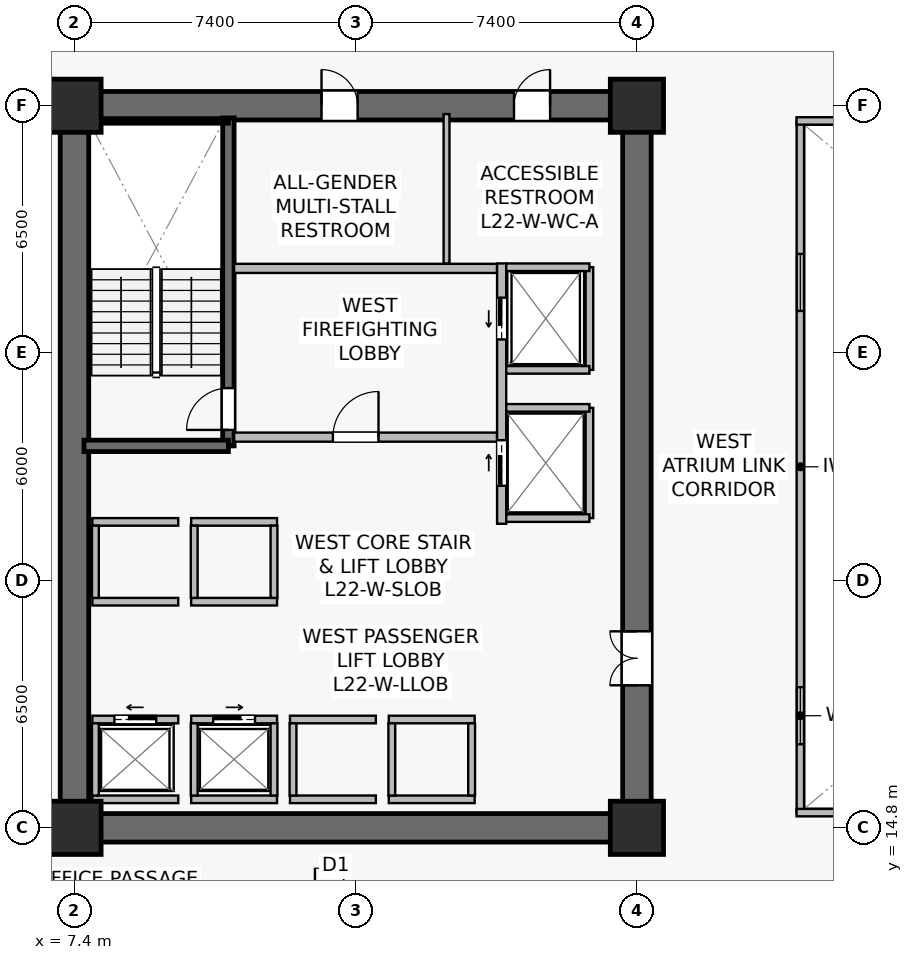
"""IFC4 building model, lengths in metres.
Left out: names, types, materials, properties, quantities, classifications, styles, units other than length and angle.
Written with IfcOpenShell. Run it as: python <this file> out.ifc"""

import sys

from ifc_helpers import new_model, si_unit, direction, frame, frame_2d, origin, origin_2d, place, context, subcontext, project, spatial, rectangle, extrude, source, transform, mapped, element, fill, save


model = new_model("IFC4")
c1 = context("Model", 3, precision=1e-05, world=origin(), true_north=direction((0.0, 1.0)))
c2 = subcontext(c1, "Body", "Model", "MODEL_VIEW")
j1 = project(units=[si_unit("LENGTHUNIT", "METRE"), si_unit("PLANEANGLEUNIT", "RADIAN")], contexts=[c1])
p1 = place(None, origin())
s1 = spatial("IfcSite", under=j1, at=p1, CompositionType="ELEMENT")
p2 = place(p1, origin())
s2 = spatial("IfcBuilding", under=s1, at=p2, CompositionType="ELEMENT")
p3 = place(p2, frame((0.0, 0.0, 90.8)))
s3 = spatial("IfcBuildingStorey", under=s2, at=p3, CompositionType="ELEMENT", Elevation=90.8)
p4 = place(p3, frame((7.025, 14.8, 0.0), z_axis=(0.0, 0.0, 1.0), x_axis=(1.0, 0.0, 0.0)))
e1 = element("IfcWall", 1, at=p4, inside=s3, PredefinedType="SHEAR", context=c2, shape_type="SweptSolid", body=[
    extrude(rectangle(XDim=15.55, YDim=0.75, at=frame_2d((7.775, 0.0))), origin(), (0.0, 0.0, 1.0), 3.78),
])
p5 = place(p3, frame((7.025, 33.8, 0.0), z_axis=(0.0, 0.0, 1.0), x_axis=(1.0, 0.0, 0.0)))
e2 = element("IfcWall", 2, at=p5, inside=s3, PredefinedType="SHEAR", context=c2, shape_type="SweptSolid", body=[
    extrude(rectangle(XDim=15.55, YDim=0.75, at=frame_2d((7.775, 0.0))), origin(), (0.0, 0.0, 1.0), 3.78),
])
p6 = place(p5, frame((6.875, 0.0, 0.0)))
e3 = element("IfcOpeningElement", 3, at=p6, cuts=e2, PredefinedType="OPENING", context=c2, shape_type="SweptSolid", body=[
    extrude(rectangle(XDim=0.95, YDim=2.15, at=frame_2d((0.475, 1.075))), frame((0.0, 0.385, 0.0), z_axis=(0.0, -1.0, 0.0), x_axis=(1.0, 0.0, 0.0)), (0.0, 0.0, 1.0), 0.77),
])
p7 = place(p5, frame((11.94, 0.0, 0.0)))
e4 = element("IfcOpeningElement", 4, at=p7, cuts=e2, PredefinedType="OPENING", context=c2, shape_type="SweptSolid", body=[
    extrude(rectangle(XDim=0.95, YDim=2.15, at=frame_2d((0.475, 1.075))), frame((0.0, 0.385, 0.0), z_axis=(0.0, -1.0, 0.0), x_axis=(1.0, 0.0, 0.0)), (0.0, 0.0, 1.0), 0.77),
])
p8 = place(p3, frame((7.4, 15.175, 0.0), z_axis=(0.0, 0.0, 1.0), x_axis=(0.0, 1.0, 0.0)))
e5 = element("IfcWall", 5, at=p8, inside=s3, PredefinedType="SHEAR", context=c2, shape_type="SweptSolid", body=[
    extrude(rectangle(XDim=18.25, YDim=0.75, at=frame_2d((9.125, 0.0))), origin(), (0.0, 0.0, 1.0), 3.78),
])
p9 = place(p3, frame((22.2, 15.175, 0.0), z_axis=(0.0, 0.0, 1.0), x_axis=(0.0, 1.0, 0.0)))
e6 = element("IfcWall", 6, at=p9, inside=s3, PredefinedType="SHEAR", context=c2, shape_type="SweptSolid", body=[
    extrude(rectangle(XDim=18.25, YDim=0.75, at=frame_2d((9.125, 0.0))), origin(), (0.0, 0.0, 1.0), 3.78),
])
p10 = place(p9, frame((3.375, 0.0, 0.0)))
e7 = element("IfcOpeningElement", 7, at=p10, cuts=e6, PredefinedType="OPENING", context=c2, shape_type="SweptSolid", body=[
    extrude(rectangle(XDim=1.42, YDim=2.2, at=frame_2d((0.71, 1.1))), frame((0.0, 0.385, 0.0), z_axis=(0.0, -1.0, 0.0), x_axis=(1.0, 0.0, 0.0)), (0.0, 0.0, 1.0), 0.77),
])
p11 = place(p3, frame((11.45, 24.85, 0.0), z_axis=(0.0, 0.0, 1.0), x_axis=(0.0, 1.0, 0.0)))
e8 = element("IfcWall", 8, at=p11, inside=s3, PredefinedType="SHEAR", context=c2, shape_type="SweptSolid", body=[
    extrude(rectangle(XDim=8.63, YDim=0.3, at=frame_2d((4.315, 0.0))), origin(), (0.0, 0.0, 1.0), 3.78),
])
p12 = place(p11, frame((0.42, 0.0, 0.0)))
e9 = element("IfcOpeningElement", 9, at=p12, cuts=e8, PredefinedType="OPENING", context=c2, shape_type="SweptSolid", body=[
    extrude(rectangle(XDim=1.1, YDim=2.15, at=frame_2d((0.55, 1.075))), frame((0.0, 0.16, 0.0), z_axis=(0.0, -1.0, 0.0), x_axis=(1.0, 0.0, 0.0)), (0.0, 0.0, 1.0), 0.32),
])
p13 = place(p3, frame((7.65, 24.85, 0.0), z_axis=(0.0, 0.0, 1.0), x_axis=(1.0, 0.0, 0.0)))
e10 = element("IfcWall", 10, at=p13, inside=s3, PredefinedType="SHEAR", context=c2, shape_type="SweptSolid", body=[
    extrude(rectangle(XDim=3.8, YDim=0.3, at=frame_2d((1.9, 0.0))), origin(), (0.0, 0.0, 1.0), 3.78),
])
p14 = place(p3, frame((7.73, 33.4, 0.0), z_axis=(0.0, 0.0, 1.0), x_axis=(1.0, 0.0, 0.0)))
e11 = element("IfcWall", 11, at=p14, inside=s3, PredefinedType="SOLIDWALL", context=c2, shape_type="SweptSolid", body=[
    extrude(rectangle(XDim=3.72, YDim=0.12, at=frame_2d((1.86, 0.0))), origin(), (0.0, 0.0, 1.0), 3.78),
])
m1 = source(origin(), c2, "Body", "SweptSolid", [
    extrude(rectangle(XDim=1.4, YDim=1.4, at=origin_2d()), origin(), (0.0, 0.0, 1.0), 4.1),
])
for number, where, z_axis, x_axis in (
    (12, (7.4, 14.8, 0.0), (0.0, 0.0, 1.0), (1.0, 0.0, 0.0)),
    (13, (22.2, 14.8, 0.0), (0.0, 0.0, 1.0), (1.0, 0.0, 0.0)),
    (14, (7.4, 33.8, 0.0), (0.0, 0.0, 1.0), (1.0, 0.0, 0.0)),
    (15, (22.2, 33.8, 0.0), (0.0, 0.0, 1.0), (1.0, 0.0, 0.0)),
):
    element("IfcColumn", number, at=place(p3, frame(where, z_axis=z_axis, x_axis=x_axis)), inside=s3, PredefinedType="COLUMN", context=c2, shape_type="MappedRepresentation", body=[
        mapped(m1, transform((0.0, 0.0, 0.0), scale=1.0)),
    ])
p15 = place(p3, frame((11.6, 25.08, 0.0), z_axis=(0.0, 0.0, 1.0), x_axis=(1.0, 0.0, 0.0)))
e16 = element("IfcWall", 16, at=p15, inside=s3, PredefinedType="SOLIDWALL", context=c2, shape_type="SweptSolid", body=[
    extrude(rectangle(XDim=6.92, YDim=0.24, at=frame_2d((3.46, 0.0))), origin(), (0.0, 0.0, 1.0), 3.115),
])
p16 = place(p15, frame((2.6, 0.0, 0.0)))
e17 = element("IfcOpeningElement", 17, at=p16, cuts=e16, PredefinedType="OPENING", context=c2, shape_type="SweptSolid", body=[
    extrude(rectangle(XDim=1.2, YDim=2.16, at=frame_2d((0.6, 1.08))), frame((0.0, 0.13, 0.0), z_axis=(0.0, -1.0, 0.0), x_axis=(1.0, 0.0, 0.0)), (0.0, 0.0, 1.0), 0.26),
])
p17 = place(p3, frame((11.6, 29.52, 0.0), z_axis=(0.0, 0.0, 1.0), x_axis=(1.0, 0.0, 0.0)))
e18 = element("IfcWall", 18, at=p17, inside=s3, PredefinedType="SOLIDWALL", context=c2, shape_type="SweptSolid", body=[
    extrude(rectangle(XDim=6.92, YDim=0.24, at=frame_2d((3.46, 0.0))), origin(), (0.0, 0.0, 1.0), 3.115),
])
p18 = place(p3, frame((18.64, 22.8, 0.0), z_axis=(0.0, 0.0, 1.0), x_axis=(0.0, 1.0, 0.0)))
e19 = element("IfcWall", 19, at=p18, inside=s3, PredefinedType="SOLIDWALL", context=c2, shape_type="SweptSolid", body=[
    extrude(rectangle(XDim=6.85, YDim=0.24, at=frame_2d((3.425, 0.0))), origin(), (0.0, 0.0, 1.0), 2.865),
])
p19 = place(p18, frame((4.85, 0.0, 0.0)))
e20 = element("IfcOpeningElement", 20, at=p19, cuts=e19, PredefinedType="OPENING", context=c2, shape_type="SweptSolid", body=[
    extrude(rectangle(XDim=1.1, YDim=2.22, at=frame_2d((0.55, 1.11))), frame((0.0, 0.13, 0.0), z_axis=(0.0, -1.0, 0.0), x_axis=(1.0, 0.0, 0.0)), (0.0, 0.0, 1.0), 0.26),
])
p20 = place(p18, frame((1.0, 0.0, 0.0)))
e21 = element("IfcOpeningElement", 21, at=p20, cuts=e19, PredefinedType="OPENING", context=c2, shape_type="SweptSolid", body=[
    extrude(rectangle(XDim=1.2, YDim=2.22, at=frame_2d((0.6, 1.11))), frame((0.0, 0.13, 0.0), z_axis=(0.0, -1.0, 0.0), x_axis=(1.0, 0.0, 0.0)), (0.0, 0.0, 1.0), 0.26),
])
p21 = place(p3, frame((7.87, 17.65, 0.0), z_axis=(0.0, 0.0, 1.0), x_axis=(1.0, 0.0, 0.0)))
e22 = element("IfcWall", 22, at=p21, inside=s3, PredefinedType="SOLIDWALL", context=c2, shape_type="SweptSolid", body=[
    extrude(rectangle(XDim=2.26, YDim=0.2, at=frame_2d((1.13, 0.0))), origin(), (0.0, 0.0, 1.0), 3.78),
])
p22 = place(p21, frame((0.58, 0.0, 0.0)))
e23 = element("IfcOpeningElement", 23, at=p22, cuts=e22, PredefinedType="OPENING", context=c2, shape_type="SweptSolid", body=[
    extrude(rectangle(XDim=1.1, YDim=2.22, at=frame_2d((0.55, 1.11))), frame((0.0, 0.11, 0.0), z_axis=(0.0, -1.0, 0.0), x_axis=(1.0, 0.0, 0.0)), (0.0, 0.0, 1.0), 0.22),
])
p23 = place(p3, frame((7.87, 15.55, 0.0), z_axis=(0.0, 0.0, 1.0), x_axis=(1.0, 0.0, 0.0)))
e24 = element("IfcWall", 24, at=p23, inside=s3, PredefinedType="SOLIDWALL", context=c2, shape_type="SweptSolid", body=[
    extrude(rectangle(XDim=2.26, YDim=0.2, at=frame_2d((1.13, 0.0))), origin(), (0.0, 0.0, 1.0), 3.78),
])
p24 = place(p3, frame((7.95, 15.65, 0.0), z_axis=(0.0, 0.0, 1.0), x_axis=(0.0, 1.0, 0.0)))
e25 = element("IfcWall", 25, at=p24, inside=s3, PredefinedType="SOLIDWALL", context=c2, shape_type="SweptSolid", body=[
    extrude(rectangle(XDim=1.9, YDim=0.18, at=frame_2d((0.95, 0.0))), origin(), (0.0, 0.0, 1.0), 3.78),
])
p25 = place(p3, frame((10.47, 17.65, 0.0), z_axis=(0.0, 0.0, 1.0), x_axis=(1.0, 0.0, 0.0)))
e26 = element("IfcWall", 26, at=p25, inside=s3, PredefinedType="SOLIDWALL", context=c2, shape_type="SweptSolid", body=[
    extrude(rectangle(XDim=2.26, YDim=0.2, at=frame_2d((1.13, 0.0))), origin(), (0.0, 0.0, 1.0), 3.78),
])
p26 = place(p25, frame((0.58, 0.0, 0.0)))
e27 = element("IfcOpeningElement", 27, at=p26, cuts=e26, PredefinedType="OPENING", context=c2, shape_type="SweptSolid", body=[
    extrude(rectangle(XDim=1.1, YDim=2.22, at=frame_2d((0.55, 1.11))), frame((0.0, 0.11, 0.0), z_axis=(0.0, -1.0, 0.0), x_axis=(1.0, 0.0, 0.0)), (0.0, 0.0, 1.0), 0.22),
])
p27 = place(p3, frame((10.47, 15.55, 0.0), z_axis=(0.0, 0.0, 1.0), x_axis=(1.0, 0.0, 0.0)))
e28 = element("IfcWall", 28, at=p27, inside=s3, PredefinedType="SOLIDWALL", context=c2, shape_type="SweptSolid", body=[
    extrude(rectangle(XDim=2.26, YDim=0.2, at=frame_2d((1.13, 0.0))), origin(), (0.0, 0.0, 1.0), 3.78),
])
for number, where, z_axis, x_axis in (
    (29, (10.55, 15.65, 0.0), (0.0, 0.0, 1.0), (0.0, 1.0, 0.0)),
    (30, (12.65, 15.65, 0.0), (0.0, 0.0, 1.0), (0.0, 1.0, 0.0)),
):
    element("IfcWall", number, at=place(p3, frame(where, z_axis=z_axis, x_axis=x_axis)), inside=s3, PredefinedType="SOLIDWALL", context=c2, shape_type="SweptSolid", body=[
        extrude(rectangle(XDim=1.9, YDim=0.18, at=frame_2d((0.95, 0.0))), origin(), (0.0, 0.0, 1.0), 3.78),
    ])
for number, where, z_axis, x_axis in (
    (31, (13.07, 17.65, 0.0), (0.0, 0.0, 1.0), (1.0, 0.0, 0.0)),
    (32, (13.07, 15.55, 0.0), (0.0, 0.0, 1.0), (1.0, 0.0, 0.0)),
):
    element("IfcWall", number, at=place(p3, frame(where, z_axis=z_axis, x_axis=x_axis)), inside=s3, PredefinedType="SOLIDWALL", context=c2, shape_type="SweptSolid", body=[
        extrude(rectangle(XDim=2.26, YDim=0.2, at=frame_2d((1.13, 0.0))), origin(), (0.0, 0.0, 1.0), 3.115),
    ])
p28 = place(p3, frame((13.15, 15.65, 0.0), z_axis=(0.0, 0.0, 1.0), x_axis=(0.0, 1.0, 0.0)))
e33 = element("IfcWall", 33, at=p28, inside=s3, PredefinedType="SOLIDWALL", context=c2, shape_type="SweptSolid", body=[
    extrude(rectangle(XDim=1.9, YDim=0.18, at=frame_2d((0.95, 0.0))), origin(), (0.0, 0.0, 1.0), 3.78),
])
for number, where, z_axis, x_axis in (
    (34, (15.67, 17.65, 0.0), (0.0, 0.0, 1.0), (1.0, 0.0, 0.0)),
    (35, (15.67, 15.55, 0.0), (0.0, 0.0, 1.0), (1.0, 0.0, 0.0)),
):
    element("IfcWall", number, at=place(p3, frame(where, z_axis=z_axis, x_axis=x_axis)), inside=s3, PredefinedType="SOLIDWALL", context=c2, shape_type="SweptSolid", body=[
        extrude(rectangle(XDim=2.26, YDim=0.2, at=frame_2d((1.13, 0.0))), origin(), (0.0, 0.0, 1.0), 3.78),
    ])
for number, where, z_axis, x_axis in (
    (36, (15.75, 15.65, 0.0), (0.0, 0.0, 1.0), (0.0, 1.0, 0.0)),
    (37, (17.85, 15.65, 0.0), (0.0, 0.0, 1.0), (0.0, 1.0, 0.0)),
):
    element("IfcWall", number, at=place(p3, frame(where, z_axis=z_axis, x_axis=x_axis)), inside=s3, PredefinedType="SOLIDWALL", context=c2, shape_type="SweptSolid", body=[
        extrude(rectangle(XDim=1.9, YDim=0.18, at=frame_2d((0.95, 0.0))), origin(), (0.0, 0.0, 1.0), 3.78),
    ])
for number, where, z_axis, x_axis in (
    (38, (7.87, 20.75, 0.0), (0.0, 0.0, 1.0), (1.0, 0.0, 0.0)),
    (39, (7.87, 22.85, 0.0), (0.0, 0.0, 1.0), (1.0, 0.0, 0.0)),
):
    element("IfcWall", number, at=place(p3, frame(where, z_axis=z_axis, x_axis=x_axis)), inside=s3, PredefinedType="SOLIDWALL", context=c2, shape_type="SweptSolid", body=[
        extrude(rectangle(XDim=2.26, YDim=0.2, at=frame_2d((1.13, 0.0))), origin(), (0.0, 0.0, 1.0), 3.78),
    ])
p29 = place(p3, frame((7.95, 20.85, 0.0), z_axis=(0.0, 0.0, 1.0), x_axis=(0.0, 1.0, 0.0)))
e40 = element("IfcWall", 40, at=p29, inside=s3, PredefinedType="SOLIDWALL", context=c2, shape_type="SweptSolid", body=[
    extrude(rectangle(XDim=1.9, YDim=0.18, at=frame_2d((0.95, 0.0))), origin(), (0.0, 0.0, 1.0), 3.78),
])
for number, where, z_axis, x_axis in (
    (41, (10.47, 20.75, 0.0), (0.0, 0.0, 1.0), (1.0, 0.0, 0.0)),
    (42, (10.47, 22.85, 0.0), (0.0, 0.0, 1.0), (1.0, 0.0, 0.0)),
):
    element("IfcWall", number, at=place(p3, frame(where, z_axis=z_axis, x_axis=x_axis)), inside=s3, PredefinedType="SOLIDWALL", context=c2, shape_type="SweptSolid", body=[
        extrude(rectangle(XDim=2.26, YDim=0.2, at=frame_2d((1.13, 0.0))), origin(), (0.0, 0.0, 1.0), 3.78),
    ])
for number, where, z_axis, x_axis in (
    (43, (10.55, 20.85, 0.0), (0.0, 0.0, 1.0), (0.0, 1.0, 0.0)),
    (44, (12.65, 20.85, 0.0), (0.0, 0.0, 1.0), (0.0, 1.0, 0.0)),
):
    element("IfcWall", number, at=place(p3, frame(where, z_axis=z_axis, x_axis=x_axis)), inside=s3, PredefinedType="SOLIDWALL", context=c2, shape_type="SweptSolid", body=[
        extrude(rectangle(XDim=1.9, YDim=0.18, at=frame_2d((0.95, 0.0))), origin(), (0.0, 0.0, 1.0), 3.78),
    ])
p30 = place(p3, frame((20.95, 26.85, 0.0), z_axis=(0.0, 0.0, 1.0), x_axis=(0.0, 1.0, 0.0)))
e45 = element("IfcWall", 45, at=p30, inside=s3, PredefinedType="SOLIDWALL", context=c2, shape_type="SweptSolid", body=[
    extrude(rectangle(XDim=2.7, YDim=0.2, at=frame_2d((1.35, 0.0))), origin(), (0.0, 0.0, 1.0), 3.78),
])
p31 = place(p3, frame((18.76, 29.55, 0.0), z_axis=(0.0, 0.0, 1.0), x_axis=(1.0, 0.0, 0.0)))
e46 = element("IfcWall", 46, at=p31, inside=s3, PredefinedType="SOLIDWALL", context=c2, shape_type="SweptSolid", body=[
    extrude(rectangle(XDim=2.19, YDim=0.2, at=frame_2d((1.095, 0.0))), origin(), (0.0, 0.0, 1.0), 3.78),
])
p32 = place(p3, frame((18.76, 26.85, 0.0), z_axis=(0.0, 0.0, 1.0), x_axis=(1.0, 0.0, 0.0)))
e47 = element("IfcWall", 47, at=p32, inside=s3, PredefinedType="SOLIDWALL", context=c2, shape_type="SweptSolid", body=[
    extrude(rectangle(XDim=2.19, YDim=0.2, at=frame_2d((1.095, 0.0))), origin(), (0.0, 0.0, 1.0), 3.177),
])
p33 = place(p3, frame((20.95, 22.95, 0.0), z_axis=(0.0, 0.0, 1.0), x_axis=(0.0, 1.0, 0.0)))
e48 = element("IfcWall", 48, at=p33, inside=s3, PredefinedType="SOLIDWALL", context=c2, shape_type="SweptSolid", body=[
    extrude(rectangle(XDim=2.9, YDim=0.2, at=frame_2d((1.45, 0.0))), origin(), (0.0, 0.0, 1.0), 2.865),
])
for number, where, z_axis, x_axis in (
    (49, (18.76, 25.85, 0.0), (0.0, 0.0, 1.0), (1.0, 0.0, 0.0)),
    (50, (18.76, 22.95, 0.0), (0.0, 0.0, 1.0), (1.0, 0.0, 0.0)),
):
    element("IfcWall", number, at=place(p3, frame(where, z_axis=z_axis, x_axis=x_axis)), inside=s3, PredefinedType="SOLIDWALL", context=c2, shape_type="SweptSolid", body=[
        extrude(rectangle(XDim=2.19, YDim=0.2, at=frame_2d((1.095, 0.0))), origin(), (0.0, 0.0, 1.0), 3.78),
    ])
p34 = place(p3, frame((17.19, 29.65, 0.0), z_axis=(0.0, 0.0, 1.0), x_axis=(0.0, 1.0, 0.0)))
e51 = element("IfcWall", 51, at=p34, inside=s3, PredefinedType="PLUMBINGWALL", context=c2, shape_type="SweptSolid", body=[
    extrude(rectangle(XDim=3.93, YDim=0.155, at=frame_2d((1.965, 0.0))), origin(), (0.0, 0.0, 1.0), 3.78),
])
p35 = place(p3, frame((26.5, 15.2, 0.0), z_axis=(0.0, 0.0, 1.0), x_axis=(0.0, 1.0, 0.0)))
e52 = element("IfcWall", 52, at=p35, inside=s3, PredefinedType="SOLIDWALL", context=c2, shape_type="SweptSolid", body=[
    extrude(rectangle(XDim=18.2, YDim=0.195, at=frame_2d((9.1, 0.0))), origin(), (0.0, 0.0, 1.0), 3.78),
])
p36 = place(p35, frame((1.8, 0.0, 0.9)))
e53 = element("IfcOpeningElement", 53, at=p36, cuts=e52, PredefinedType="OPENING", context=c2, shape_type="SweptSolid", body=[
    extrude(rectangle(XDim=1.5, YDim=1.4, at=frame_2d((0.75, 0.7))), frame((0.0, 0.107, 0.0), z_axis=(0.0, -1.0, 0.0), x_axis=(1.0, 0.0, 0.0)), (0.0, 0.0, 1.0), 0.215),
])
p37 = place(p35, frame((13.2, 0.0, 0.9)))
e54 = element("IfcOpeningElement", 54, at=p37, cuts=e52, PredefinedType="OPENING", context=c2, shape_type="SweptSolid", body=[
    extrude(rectangle(XDim=1.5, YDim=1.4, at=frame_2d((0.75, 0.7))), frame((0.0, 0.107, 0.0), z_axis=(0.0, -1.0, 0.0), x_axis=(1.0, 0.0, 0.0)), (0.0, 0.0, 1.0), 0.215),
])
for number, where, z_axis, x_axis in (
    (55, (26.4, 15.2, 0.0), (0.0, 0.0, 1.0), (1.0, 0.0, 0.0)),
    (56, (26.4, 33.4, 0.0), (0.0, 0.0, 1.0), (1.0, 0.0, 0.0)),
):
    element("IfcWall", number, at=place(p3, frame(where, z_axis=z_axis, x_axis=x_axis)), inside=s3, PredefinedType="SOLIDWALL", context=c2, shape_type="SweptSolid", body=[
        extrude(rectangle(XDim=22.0, YDim=0.195, at=frame_2d((11.0, 0.0))), origin(), (0.0, 0.0, 1.0), 3.78),
    ])
m2 = source(origin(), c2, "Body", "SweptSolid", [
    extrude(rectangle(XDim=1.5, YDim=1.4, at=frame_2d((0.75, 0.7))), frame((0.0, 0.03, 0.0), z_axis=(0.0, -1.0, 0.0), x_axis=(1.0, 0.0, 0.0)), (0.0, 0.0, 1.0), 0.06),
])
p38 = place(p36, origin())
e57 = element("IfcWindow", 57, at=p38, inside=s3, PartitioningType="SINGLE_PANEL", PredefinedType="WINDOW", context=c2, shape_type="MappedRepresentation", body=[
    mapped(m2, transform((0.0, 0.0, 0.0), scale=1.0)),
])
fill(e53, e57)
p39 = place(p37, origin())
e58 = element("IfcWindow", 58, at=p39, inside=s3, PartitioningType="SINGLE_PANEL", PredefinedType="WINDOW", context=c2, shape_type="MappedRepresentation", body=[
    mapped(m2, transform((0.0, 0.0, 0.0), scale=1.0)),
])
fill(e54, e58)
m3 = source(origin(), c2, "Body", "SweptSolid", [
    extrude(rectangle(XDim=1.1, YDim=2.15, at=frame_2d((0.55, 1.075))), frame((0.0, 0.025, 0.0), z_axis=(0.0, -1.0, 0.0), x_axis=(1.0, 0.0, 0.0)), (0.0, 0.0, 1.0), 0.05),
])
p40 = place(p12, origin())
e59 = element("IfcDoor", 59, at=p40, inside=s3, OperationType="SINGLE_SWING_LEFT", PredefinedType="DOOR", context=c2, shape_type="MappedRepresentation", body=[
    mapped(m3, transform((0.0, 0.0, 0.0), scale=1.0)),
])
fill(e9, e59)
m4 = source(origin(), c2, "Body", "SweptSolid", [
    extrude(rectangle(XDim=1.2, YDim=2.16, at=frame_2d((0.6, 1.08))), frame((0.0, 0.025, 0.0), z_axis=(0.0, -1.0, 0.0), x_axis=(1.0, 0.0, 0.0)), (0.0, 0.0, 1.0), 0.05),
])
p41 = place(p16, origin())
e60 = element("IfcDoor", 60, at=p41, inside=s3, OperationType="SINGLE_SWING_RIGHT", PredefinedType="DOOR", context=c2, shape_type="MappedRepresentation", body=[
    mapped(m4, transform((0.0, 0.0, 0.0), scale=1.0)),
])
fill(e17, e60)
m5 = source(origin(), c2, "Body", "SweptSolid", [
    extrude(rectangle(XDim=1.1, YDim=2.22, at=frame_2d((0.55, 1.11))), frame((0.0, 0.025, 0.0), z_axis=(0.0, -1.0, 0.0), x_axis=(1.0, 0.0, 0.0)), (0.0, 0.0, 1.0), 0.05),
])
p42 = place(p22, origin())
e61 = element("IfcDoor", 61, at=p42, inside=s3, OperationType="SLIDING_TO_LEFT", PredefinedType="USERDEFINED", context=c2, shape_type="MappedRepresentation", body=[
    mapped(m5, transform((0.0, 0.0, 0.0), scale=1.0)),
])
fill(e23, e61)
p43 = place(p26, origin())
e62 = element("IfcDoor", 62, at=p43, inside=s3, OperationType="SLIDING_TO_RIGHT", PredefinedType="USERDEFINED", context=c2, shape_type="MappedRepresentation", body=[
    mapped(m5, transform((0.0, 0.0, 0.0), scale=1.0)),
])
fill(e27, e62)
p44 = place(p19, origin())
e63 = element("IfcDoor", 63, at=p44, inside=s3, OperationType="SLIDING_TO_LEFT", PredefinedType="USERDEFINED", context=c2, shape_type="MappedRepresentation", body=[
    mapped(m5, transform((0.0, 0.0, 0.0), scale=1.0)),
])
fill(e20, e63)
m6 = source(origin(), c2, "Body", "SweptSolid", [
    extrude(rectangle(XDim=1.2, YDim=2.22, at=frame_2d((0.6, 1.11))), frame((0.0, 0.025, 0.0), z_axis=(0.0, -1.0, 0.0), x_axis=(1.0, 0.0, 0.0)), (0.0, 0.0, 1.0), 0.05),
])
p45 = place(p20, origin())
e64 = element("IfcDoor", 64, at=p45, inside=s3, OperationType="SLIDING_TO_RIGHT", PredefinedType="USERDEFINED", context=c2, shape_type="MappedRepresentation", body=[
    mapped(m6, transform((0.0, 0.0, 0.0), scale=1.0)),
])
fill(e21, e64)
m7 = source(origin(), c2, "Body", "SweptSolid", [
    extrude(rectangle(XDim=1.42, YDim=2.2, at=frame_2d((0.71, 1.1))), frame((0.0, 0.025, 0.0), z_axis=(0.0, -1.0, 0.0), x_axis=(1.0, 0.0, 0.0)), (0.0, 0.0, 1.0), 0.05),
])
p46 = place(p10, origin())
e65 = element("IfcDoor", 65, at=p46, inside=s3, OperationType="DOUBLE_DOOR_SINGLE_SWING", PredefinedType="DOOR", context=c2, shape_type="MappedRepresentation", body=[
    mapped(m7, transform((0.0, 0.0, 0.0), scale=1.0)),
])
fill(e7, e65)
m8 = source(origin(), c2, "Body", "SweptSolid", [
    extrude(rectangle(XDim=0.95, YDim=2.15, at=frame_2d((0.475, 1.075))), frame((0.0, 0.025, 0.0), z_axis=(0.0, -1.0, 0.0), x_axis=(1.0, 0.0, 0.0)), (0.0, 0.0, 1.0), 0.05),
])
p47 = place(p6, origin())
e66 = element("IfcDoor", 66, at=p47, inside=s3, OperationType="SINGLE_SWING_LEFT", PredefinedType="DOOR", context=c2, shape_type="MappedRepresentation", body=[
    mapped(m8, transform((0.0, 0.0, 0.0), scale=1.0)),
])
fill(e3, e66)
p48 = place(p7, origin())
e67 = element("IfcDoor", 67, at=p48, inside=s3, OperationType="SINGLE_SWING_RIGHT", PredefinedType="DOOR", context=c2, shape_type="MappedRepresentation", body=[
    mapped(m8, transform((0.0, 0.0, 0.0), scale=1.0)),
])
fill(e4, e67)
save(model, sys.argv[1])
